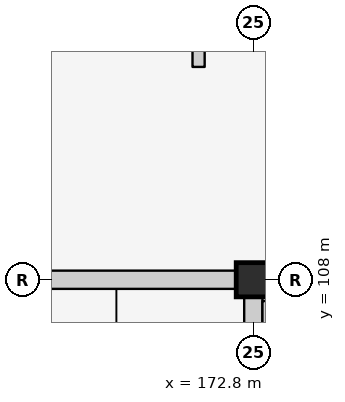
"""IFC4 building model, lengths in metres.
Left out: names, types, materials, properties, quantities, classifications, styles, units other than length and angle.
Written with IfcOpenShell. Run it as: python <this file> out.ifc"""

import sys

from ifc_helpers import new_model, si_unit, direction, frame, frame_2d, origin, origin_2d, place, context, subcontext, project, spatial, rectangle, extrude, element, save


model = new_model("IFC4")
c1 = context("Model", 3, precision=1e-05, world=origin(), true_north=direction((0.0, 1.0)))
c2 = subcontext(c1, "Body", "Model", "MODEL_VIEW")
j1 = project(units=[si_unit("LENGTHUNIT", "METRE"), si_unit("PLANEANGLEUNIT", "RADIAN")], contexts=[c1])
p1 = place(None, origin())
s1 = spatial("IfcSite", under=j1, at=p1, CompositionType="ELEMENT")
p2 = place(p1, origin())
s2 = spatial("IfcBuilding", under=s1, at=p2, CompositionType="ELEMENT")
p3 = place(p2, frame((0.0, 0.0, 34.8)))
s3 = spatial("IfcBuildingStorey", under=s2, at=p3, CompositionType="ELEMENT", Elevation=34.8)
p4 = place(p3, frame((172.8, 108.0, 0.0), z_axis=(0.0, 0.0, 1.0), x_axis=(1.0, 0.0, 0.0)))
e1 = element("IfcColumn", 1, at=p4, inside=s3, PredefinedType="COLUMN", context=c2, shape_type="SweptSolid", body=[
    extrude(rectangle(XDim=0.45, YDim=0.45, at=origin_2d()), origin(), (0.0, 0.0, 1.0), 3.2),
])
p5 = place(p3, frame((165.825, 108.0, 0.0), z_axis=(0.0, 0.0, 1.0), x_axis=(1.0, 0.0, 0.0)))
e2 = element("IfcWall", 2, at=p5, inside=s3, PredefinedType="ELEMENTEDWALL", context=c2, shape_type="SweptSolid", body=[
    extrude(rectangle(XDim=6.75, YDim=0.24, at=frame_2d((3.375, 0.0))), origin(), (0.0, 0.0, 1.0), 2.345),
])
p6 = place(p5, frame((2.875, 0.0, 1.2)))
e3 = element("IfcOpeningElement", 3, at=p6, cuts=e2, PredefinedType="OPENING", context=c2, shape_type="SweptSolid", body=[
    extrude(rectangle(XDim=1.0, YDim=0.9, at=frame_2d((0.5, 0.45))), frame((0.0, 0.135, 0.0), z_axis=(0.0, -1.0, 0.0), x_axis=(1.0, 0.0, 0.0)), (0.0, 0.0, 1.0), 0.27),
])
p7 = place(p3, frame((172.8, 101.025, 0.0), z_axis=(0.0, 0.0, 1.0), x_axis=(0.0, 1.0, 0.0)))
e4 = element("IfcWall", 4, at=p7, inside=s3, PredefinedType="ELEMENTEDWALL", context=c2, shape_type="SweptSolid", body=[
    extrude(rectangle(XDim=6.75, YDim=0.24, at=frame_2d((3.375, 0.0))), origin(), (0.0, 0.0, 1.0), 2.445),
])
p8 = place(p7, frame((2.5, 0.0, 0.0)))
e5 = element("IfcOpeningElement", 5, at=p8, cuts=e4, PredefinedType="OPENING", context=c2, shape_type="SweptSolid", body=[
    extrude(rectangle(XDim=1.4, YDim=2.1, at=frame_2d((0.7, 1.05))), frame((0.0, 0.135, 0.0), z_axis=(0.0, -1.0, 0.0), x_axis=(1.0, 0.0, 0.0)), (0.0, 0.0, 1.0), 0.27),
])
p9 = place(p3, frame((172.08, 110.8, 0.0), z_axis=(0.0, 0.0, 1.0), x_axis=(0.0, 1.0, 0.0)))
e6 = element("IfcWall", 6, at=p9, inside=s3, PredefinedType="PARTITIONING", context=c2, shape_type="SweptSolid", body=[
    extrude(rectangle(XDim=4.32, YDim=0.16, at=frame_2d((2.16, 0.0))), origin(), (0.0, 0.0, 1.0), 2.96),
])
p10 = place(p9, frame((2.4, 0.0, 0.0)))
e7 = element("IfcOpeningElement", 7, at=p10, cuts=e6, PredefinedType="OPENING", context=c2, shape_type="SweptSolid", body=[
    extrude(rectangle(XDim=1.2, YDim=2.2, at=frame_2d((0.6, 1.1))), frame((0.0, 0.095, 0.0), z_axis=(0.0, -1.0, 0.0), x_axis=(1.0, 0.0, 0.0)), (0.0, 0.0, 1.0), 0.19),
])
p11 = place(p3, frame((173.0, 101.08, 0.0), z_axis=(0.0, 0.0, 1.0), x_axis=(0.0, 1.0, 0.0)))
e8 = element("IfcWall", 8, at=p11, inside=s3, PredefinedType="PARTITIONING", context=c2, shape_type="SweptSolid", body=[
    extrude(rectangle(XDim=6.64, YDim=0.16, at=frame_2d((3.32, 0.0))), origin(), (0.0, 0.0, 1.0), 2.96),
])
p12 = place(p11, frame((2.81, 0.0, 0.0)))
e9 = element("IfcOpeningElement", 9, at=p12, cuts=e8, PredefinedType="OPENING", context=c2, shape_type="SweptSolid", body=[
    extrude(rectangle(XDim=1.02, YDim=2.18, at=frame_2d((0.51, 1.09))), frame((0.0, 0.095, 0.0), z_axis=(0.0, -1.0, 0.0), x_axis=(1.0, 0.0, 0.0)), (0.0, 0.0, 1.0), 0.19),
])
save(model, sys.argv[1])
